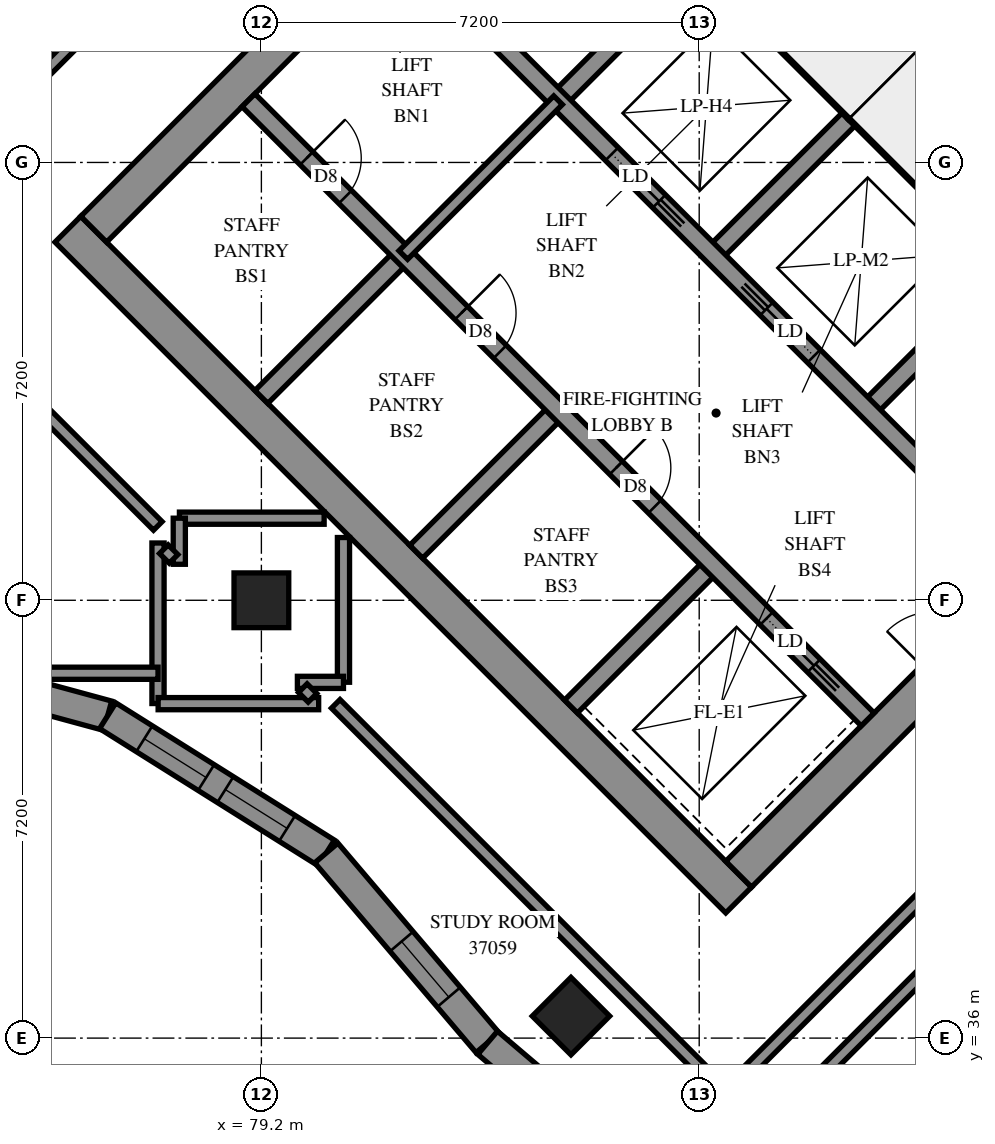
"""IFC4 building model, lengths in metres.
Left out: names, types, materials, properties, quantities, classifications, styles, units other than length and angle.
Written with IfcOpenShell. Run it as: python <this file> out.ifc"""

import sys

from ifc_helpers import new_model, si_unit, direction, frame, frame_2d, origin, origin_2d, place, context, subcontext, project, spatial, polyline, rectangle, outline, extrude, element, fill, save


model = new_model("IFC4")
c1 = context("Model", 3, precision=1e-05, world=origin(), true_north=direction((0.0, 1.0)))
c2 = subcontext(c1, "Body", "Model", "MODEL_VIEW")
j1 = project(units=[si_unit("LENGTHUNIT", "METRE"), si_unit("PLANEANGLEUNIT", "RADIAN")], contexts=[c1])
p1 = place(None, origin())
s1 = spatial("IfcSite", under=j1, at=p1, CompositionType="ELEMENT")
p2 = place(p1, origin())
s2 = spatial("IfcBuilding", under=s1, at=p2, CompositionType="ELEMENT")
p3 = place(p2, frame((0.0, 0.0, 138.8)))
s3 = spatial("IfcBuildingStorey", under=s2, at=p3, CompositionType="ELEMENT", Elevation=138.8)
for number, where, z_axis, x_axis in (
    (1, (79.2, 43.2, 0.0), (0.0, 0.0, 1.0), (1.0, 0.0, 0.0)),
    (2, (84.291, 36.362, 0.0), (0.0, 0.0, 1.0), (0.707, -0.707, 0.0)),
):
    element("IfcColumn", number, at=place(p3, frame(where, z_axis=z_axis, x_axis=x_axis)), inside=s3, PredefinedType="COLUMN", context=c2, shape_type="SweptSolid", body=[
        extrude(rectangle(XDim=0.9, YDim=0.9, at=origin_2d()), origin(), (0.0, 0.0, 1.0), 3.1),
    ])
p4 = place(p3, frame((76.018, 49.302, -0.3), z_axis=(0.0, 0.0, 1.0), x_axis=(0.7071067812, -0.7071067812, 0.0)))
e3 = element("IfcWall", 3, at=p4, inside=s3, PredefinedType="SHEAR", context=c2, shape_type="SweptSolid", body=[
    extrude(rectangle(XDim=15.6, YDim=0.6, at=frame_2d((7.8, 0.0))), origin(), (0.0, 0.0, 1.0), 2.7),
])
p5 = place(p3, frame((86.625, 59.908, -0.3), z_axis=(0.0, 0.0, 1.0), x_axis=(0.7071067812, -0.7071067812, 0.0)))
e4 = element("IfcWall", 4, at=p5, inside=s3, PredefinedType="SHEAR", context=c2, shape_type="SweptSolid", body=[
    extrude(rectangle(XDim=15.6, YDim=0.6, at=frame_2d((7.8, 0.0))), origin(), (0.0, 0.0, 1.0), 2.7),
])
p6 = place(p5, frame((10.6, 0.0, 0.3)))
e5 = element("IfcOpeningElement", 5, at=p6, cuts=e4, PredefinedType="OPENING", context=c2, shape_type="SweptSolid", body=[
    extrude(rectangle(XDim=0.8, YDim=2.1, at=frame_2d((0.4, 1.05))), frame((0.0, 0.31, 0.0), z_axis=(0.0, -1.0, 0.0), x_axis=(1.0, 0.0, 0.0)), (0.0, 0.0, 1.0), 0.62),
])
p7 = place(p3, frame((76.442, 49.302, -0.3), z_axis=(0.0, 0.0, 1.0), x_axis=(0.7071067812, 0.7071067812, 0.0)))
e6 = element("IfcWall", 6, at=p7, inside=s3, PredefinedType="SHEAR", context=c2, shape_type="SweptSolid", body=[
    extrude(rectangle(XDim=14.4, YDim=0.6, at=frame_2d((7.2, 0.0))), origin(), (0.0, 0.0, 1.0), 2.7),
])
p8 = place(p7, frame((4.55, 0.0, 0.3)))
e7 = element("IfcOpeningElement", 7, at=p8, cuts=e6, PredefinedType="OPENING", context=c2, shape_type="SweptSolid", body=[
    extrude(rectangle(XDim=1.1, YDim=2.1, at=frame_2d((0.55, 1.05))), frame((0.0, 0.31, 0.0), z_axis=(0.0, -1.0, 0.0), x_axis=(1.0, 0.0, 0.0)), (0.0, 0.0, 1.0), 0.62),
])
p9 = place(p7, frame((11.35, 0.0, 0.3)))
e8 = element("IfcOpeningElement", 8, at=p9, cuts=e6, PredefinedType="OPENING", context=c2, shape_type="SweptSolid", body=[
    extrude(rectangle(XDim=1.1, YDim=2.1, at=frame_2d((0.55, 1.05))), frame((0.0, 0.31, 0.0), z_axis=(0.0, -1.0, 0.0), x_axis=(1.0, 0.0, 0.0)), (0.0, 0.0, 1.0), 0.62),
])
p10 = place(p3, frame((87.049, 38.695, -0.3), z_axis=(0.0, 0.0, 1.0), x_axis=(0.7071067812, 0.7071067812, 0.0)))
e9 = element("IfcWall", 9, at=p10, inside=s3, PredefinedType="SHEAR", context=c2, shape_type="SweptSolid", body=[
    extrude(rectangle(XDim=14.4, YDim=0.6, at=frame_2d((7.2, 0.0))), origin(), (0.0, 0.0, 1.0), 2.7),
])
p11 = place(p10, frame((4.55, 0.0, 0.3)))
e10 = element("IfcOpeningElement", 10, at=p11, cuts=e9, PredefinedType="OPENING", context=c2, shape_type="SweptSolid", body=[
    extrude(rectangle(XDim=1.1, YDim=2.1, at=frame_2d((0.55, 1.05))), frame((0.0, 0.31, 0.0), z_axis=(0.0, -1.0, 0.0), x_axis=(1.0, 0.0, 0.0)), (0.0, 0.0, 1.0), 0.62),
])
p12 = place(p10, frame((11.35, 0.0, 0.3)))
e11 = element("IfcOpeningElement", 11, at=p12, cuts=e9, PredefinedType="OPENING", context=c2, shape_type="SweptSolid", body=[
    extrude(rectangle(XDim=1.1, YDim=2.1, at=frame_2d((0.55, 1.05))), frame((0.0, 0.31, 0.0), z_axis=(0.0, -1.0, 0.0), x_axis=(1.0, 0.0, 0.0)), (0.0, 0.0, 1.0), 0.62),
])
for number, where, z_axis, x_axis in (
    (12, (79.2, 46.544, 0.0), (0.0, 0.0, 1.0), (0.707, 0.707, 0.0)),
    (13, (84.079, 51.423, 0.0), (0.0, 0.0, 1.0), (0.707, 0.707, 0.0)),
):
    element("IfcWall", number, at=place(p3, frame(where, z_axis=z_axis, x_axis=x_axis)), inside=s3, PredefinedType="SOLIDWALL", context=c2, shape_type="SweptSolid", body=[
        extrude(rectangle(XDim=3.3, YDim=0.3, at=frame_2d((1.65, 0.0))), origin(), (0.0, 0.0, 1.0), 3.1),
    ])
p13 = place(p3, frame((81.746, 43.999, 0.0), z_axis=(0.0, 0.0, 1.0), x_axis=(0.7071067812, 0.7071067812, 0.0)))
e14 = element("IfcWall", 14, at=p13, inside=s3, PredefinedType="SOLIDWALL", context=c2, shape_type="SweptSolid", body=[
    extrude(rectangle(XDim=3.3, YDim=0.3, at=frame_2d((1.65, 0.0))), origin(), (0.0, 0.0, 1.0), 3.1),
])
p14 = place(p3, frame((86.625, 48.878, 0.0), z_axis=(0.0, 0.0, 1.0), x_axis=(0.7071067812, 0.7071067812, 0.0)))
e15 = element("IfcWall", 15, at=p14, inside=s3, PredefinedType="SOLIDWALL", context=c2, shape_type="SweptSolid", body=[
    extrude(rectangle(XDim=3.3, YDim=0.3, at=frame_2d((1.65, 0.0))), origin(), (0.0, 0.0, 1.0), 3.1),
])
p15 = place(p3, frame((84.291, 41.453, 0.0), z_axis=(0.0, 0.0, 1.0), x_axis=(0.7071067812, 0.7071067812, 0.0)))
e16 = element("IfcWall", 16, at=p15, inside=s3, PredefinedType="SOLIDWALL", context=c2, shape_type="SweptSolid", body=[
    extrude(rectangle(XDim=3.3, YDim=0.3, at=frame_2d((1.65, 0.0))), origin(), (0.0, 0.0, 1.0), 3.1),
])
p16 = place(p3, frame((89.17, 46.332, 0.0), z_axis=(0.0, 0.0, 1.0), x_axis=(0.7071067812, 0.7071067812, 0.0)))
e17 = element("IfcWall", 17, at=p16, inside=s3, PredefinedType="SOLIDWALL", context=c2, shape_type="SweptSolid", body=[
    extrude(rectangle(XDim=3.3, YDim=0.3, at=frame_2d((1.65, 0.0))), origin(), (0.0, 0.0, 1.0), 3.1),
])
p17 = place(p3, frame((78.988, 51.423, 0.0), z_axis=(0.0, 0.0, 1.0), x_axis=(0.7071067812, -0.7071067812, 0.0)))
e18 = element("IfcWall", 18, at=p17, inside=s3, PredefinedType="SOLIDWALL", context=c2, shape_type="SweptSolid", body=[
    extrude(rectangle(XDim=14.4, YDim=0.3, at=frame_2d((7.2, 0.0))), origin(), (0.0, 0.0, 1.0), 3.1),
])
p18 = place(p17, frame((1.35, 0.0, 0.0)))
e19 = element("IfcOpeningElement", 19, at=p18, cuts=e18, PredefinedType="OPENING", context=c2, shape_type="SweptSolid", body=[
    extrude(rectangle(XDim=0.9, YDim=2.1, at=frame_2d((0.45, 1.05))), frame((0.0, 0.16, 0.0), z_axis=(0.0, -1.0, 0.0), x_axis=(1.0, 0.0, 0.0)), (0.0, 0.0, 1.0), 0.32),
])
p19 = place(p17, frame((4.95, 0.0, 0.0)))
e20 = element("IfcOpeningElement", 20, at=p19, cuts=e18, PredefinedType="OPENING", context=c2, shape_type="SweptSolid", body=[
    extrude(rectangle(XDim=0.9, YDim=2.1, at=frame_2d((0.45, 1.05))), frame((0.0, 0.16, 0.0), z_axis=(0.0, -1.0, 0.0), x_axis=(1.0, 0.0, 0.0)), (0.0, 0.0, 1.0), 0.32),
])
p20 = place(p17, frame((8.55, 0.0, 0.0)))
e21 = element("IfcOpeningElement", 21, at=p20, cuts=e18, PredefinedType="OPENING", context=c2, shape_type="SweptSolid", body=[
    extrude(rectangle(XDim=0.9, YDim=2.1, at=frame_2d((0.45, 1.05))), frame((0.0, 0.16, 0.0), z_axis=(0.0, -1.0, 0.0), x_axis=(1.0, 0.0, 0.0)), (0.0, 0.0, 1.0), 0.32),
])
p21 = place(p17, frame((12.05, 0.0, 0.0)))
e22 = element("IfcOpeningElement", 22, at=p21, cuts=e18, PredefinedType="OPENING", context=c2, shape_type="SweptSolid", body=[
    extrude(rectangle(XDim=1.1, YDim=2.1, at=frame_2d((0.55, 1.05))), frame((0.0, 0.16, 0.0), z_axis=(0.0, -1.0, 0.0), x_axis=(1.0, 0.0, 0.0)), (0.0, 0.0, 1.0), 0.32),
])
p22 = place(p3, frame((81.534, 53.969, 0.0), z_axis=(0.0, 0.0, 1.0), x_axis=(0.707103309, -0.7071102534, 0.0)))
e23 = element("IfcWall", 23, at=p22, inside=s3, PredefinedType="SOLIDWALL", context=c2, shape_type="SweptSolid", body=[
    extrude(rectangle(XDim=14.4, YDim=0.3, at=frame_2d((7.2, 0.0))), origin(), (0.0, 0.0, 1.0), 3.1),
])
p23 = place(p22, frame((1.25, 0.0, 0.0)))
e24 = element("IfcOpeningElement", 24, at=p23, cuts=e23, PredefinedType="OPENING", context=c2, shape_type="SweptSolid", body=[
    extrude(rectangle(XDim=1.1, YDim=2.1, at=frame_2d((0.55, 1.05))), frame((0.0, 0.16, 0.0), z_axis=(0.0, -1.0, 0.0), x_axis=(1.0, 0.0, 0.0)), (0.0, 0.0, 1.0), 0.32),
])
p24 = place(p22, frame((4.85, 0.0, 0.0)))
e25 = element("IfcOpeningElement", 25, at=p24, cuts=e23, PredefinedType="OPENING", context=c2, shape_type="SweptSolid", body=[
    extrude(rectangle(XDim=1.1, YDim=2.1, at=frame_2d((0.55, 1.05))), frame((0.0, 0.16, 0.0), z_axis=(0.0, -1.0, 0.0), x_axis=(1.0, 0.0, 0.0)), (0.0, 0.0, 1.0), 0.32),
])
p25 = place(p22, frame((8.45, 0.0, 0.0)))
e26 = element("IfcOpeningElement", 26, at=p25, cuts=e23, PredefinedType="OPENING", context=c2, shape_type="SweptSolid", body=[
    extrude(rectangle(XDim=1.1, YDim=2.1, at=frame_2d((0.55, 1.05))), frame((0.0, 0.16, 0.0), z_axis=(0.0, -1.0, 0.0), x_axis=(1.0, 0.0, 0.0)), (0.0, 0.0, 1.0), 0.32),
])
p26 = place(p22, frame((12.05, 0.0, 0.0)))
e27 = element("IfcOpeningElement", 27, at=p26, cuts=e23, PredefinedType="OPENING", context=c2, shape_type="SweptSolid", body=[
    extrude(rectangle(XDim=1.1, YDim=2.1, at=frame_2d((0.55, 1.05))), frame((0.0, 0.16, 0.0), z_axis=(0.0, -1.0, 0.0), x_axis=(1.0, 0.0, 0.0)), (0.0, 0.0, 1.0), 0.32),
])
for number, where, z_axis, x_axis in (
    (28, (83.867, 56.302, 0.0), (0.0, 0.0, 1.0), (0.707, -0.707, 0.0)),
    (29, (88.958, 51.211, 0.0), (0.0, 0.0, 1.0), (0.707, -0.707, 0.0)),
):
    element("IfcWall", number, at=place(p3, frame(where, z_axis=z_axis, x_axis=x_axis)), inside=s3, PredefinedType="SOLIDWALL", context=c2, shape_type="SweptSolid", body=[
        extrude(rectangle(XDim=7.2, YDim=0.3, at=frame_2d((3.6, 0.0))), origin(), (0.0, 0.0, 1.0), 3.1),
    ])
p27 = place(p3, frame((88.958, 51.211, 0.0), z_axis=(0.0, 0.0, 1.0), x_axis=(0.7071067812, 0.7071067812, 0.0)))
e30 = element("IfcWall", 30, at=p27, inside=s3, PredefinedType="SOLIDWALL", context=c2, shape_type="SweptSolid", body=[
    extrude(rectangle(XDim=4.2, YDim=0.3, at=frame_2d((2.1, 0.0))), origin(), (0.0, 0.0, 1.0), 3.1),
])
p28 = place(p3, frame((73.171, 42.253, 0.0), z_axis=(0.0, 0.0, 1.0), x_axis=(0.9649873507, -0.2622964218, 0.0)))
e31 = element("IfcWall", 31, at=p28, inside=s3, PredefinedType="SOLIDWALL", context=c2, shape_type="SweptSolid", body=[
    extrude(outline(polyline([(0.046, -0.25), (3.591, -0.25), (3.666, 0.25), (-0.046, 0.25), (0.046, -0.25)])), origin(), (0.0, 0.0, 1.0), 3.1),
])
p29 = place(p28, frame((0.609, 0.0, 0.45)))
e32 = element("IfcOpeningElement", 32, at=p29, cuts=e31, PredefinedType="OPENING", context=c2, shape_type="SweptSolid", body=[
    extrude(rectangle(XDim=1.2, YDim=2.5, at=frame_2d((0.6, 1.25))), frame((0.0, 0.26, 0.0), z_axis=(0.0, -1.0, 0.0), x_axis=(1.0, 0.0, 0.0)), (0.0, 0.0, 1.0), 0.52),
])
p30 = place(p3, frame((76.672, 41.301, 0.0), z_axis=(0.0, 0.0, 1.0), x_axis=(0.8470056686, -0.5315838574, 0.0)))
e33 = element("IfcWall", 33, at=p30, inside=s3, PredefinedType="SOLIDWALL", context=c2, shape_type="SweptSolid", body=[
    extrude(outline(polyline([(0.037, -0.25), (4.207, -0.25), (4.284, 0.25), (-0.037, 0.25), (0.037, -0.25)])), origin(), (0.0, 0.0, 1.0), 3.1),
])
p31 = place(p30, frame((0.712, 0.0, 0.45)))
e34 = element("IfcOpeningElement", 34, at=p31, cuts=e33, PredefinedType="OPENING", context=c2, shape_type="SweptSolid", body=[
    extrude(rectangle(XDim=1.2, YDim=2.5, at=frame_2d((0.6, 1.25))), frame((0.0, 0.26, 0.0), z_axis=(0.0, -1.0, 0.0), x_axis=(1.0, 0.0, 0.0)), (0.0, 0.0, 1.0), 0.52),
])
p32 = place(p30, frame((2.285, 0.0, 0.45)))
e35 = element("IfcOpeningElement", 35, at=p32, cuts=e33, PredefinedType="OPENING", context=c2, shape_type="SweptSolid", body=[
    extrude(rectangle(XDim=1.2, YDim=2.5, at=frame_2d((0.6, 1.25))), frame((0.0, 0.26, 0.0), z_axis=(0.0, -1.0, 0.0), x_axis=(1.0, 0.0, 0.0)), (0.0, 0.0, 1.0), 0.52),
])
p33 = place(p3, frame((80.268, 39.045, 0.0), z_axis=(0.0, 0.0, 1.0), x_axis=(0.6475669262, -0.76200858, 0.0)))
e36 = element("IfcWall", 36, at=p33, inside=s3, PredefinedType="SOLIDWALL", context=c2, shape_type="SweptSolid", body=[
    extrude(outline(polyline([(0.038, -0.25), (4.117, -0.25), (4.076, 0.25), (-0.038, 0.25), (0.038, -0.25)])), origin(), (0.0, 0.0, 1.0), 3.1),
])
p34 = place(p33, frame((1.911, 0.0, 0.45)))
e37 = element("IfcOpeningElement", 37, at=p34, cuts=e36, PredefinedType="OPENING", context=c2, shape_type="SweptSolid", body=[
    extrude(rectangle(XDim=1.2, YDim=2.5, at=frame_2d((0.6, 1.25))), frame((0.0, 0.26, 0.0), z_axis=(0.0, -1.0, 0.0), x_axis=(1.0, 0.0, 0.0)), (0.0, 0.0, 1.0), 0.52),
])
p35 = place(p3, frame((82.921, 35.923, 0.0), z_axis=(0.0, 0.0, 1.0), x_axis=(0.7620191747, -0.647554459, 0.0)))
e38 = element("IfcWall", 38, at=p35, inside=s3, PredefinedType="SOLIDWALL", context=c2, shape_type="SweptSolid", body=[
    extrude(outline(polyline([(-0.02, -0.25), (4.058, -0.25), (4.098, 0.25), (0.02, 0.25), (-0.02, -0.25)])), origin(), (0.0, 0.0, 1.0), 3.1),
])
p36 = place(p35, frame((0.87, 0.0, 0.45)))
e39 = element("IfcOpeningElement", 39, at=p36, cuts=e38, PredefinedType="OPENING", context=c2, shape_type="SweptSolid", body=[
    extrude(rectangle(XDim=2.8, YDim=2.5, at=frame_2d((1.4, 1.25))), frame((0.0, 0.26, 0.0), z_axis=(0.0, -1.0, 0.0), x_axis=(1.0, 0.0, 0.0)), (0.0, 0.0, 1.0), 0.52),
])
p37 = place(p3, frame((81.534, 48.878, 0.0), z_axis=(0.0, 0.0, 1.0), x_axis=(0.707092892, 0.7071206701, 0.0)))
e40 = element("IfcWall", 40, at=p37, inside=s3, PredefinedType="PARTITIONING", context=c2, shape_type="SweptSolid", body=[
    extrude(rectangle(XDim=3.6, YDim=0.2, at=frame_2d((1.8, 0.0))), origin(), (0.0, 0.0, 1.0), 3.1),
])
p38 = place(p3, frame((86.331, 33.312, 0.0), z_axis=(0.0, 0.0, 1.0), x_axis=(0.7071067812, 0.7071067812, 0.0)))
e41 = element("IfcWall", 41, at=p38, inside=s3, PredefinedType="PARTITIONING", context=c2, shape_type="SweptSolid", body=[
    extrude(rectangle(XDim=10.514, YDim=0.2, at=frame_2d((5.257, 0.0))), origin(), (0.0, 0.0, 1.0), 3.1),
])
p39 = place(p3, frame((80.423, 41.497, 0.0), z_axis=(0.0, 0.0, 1.0), x_axis=(0.7071067812, -0.7071067812, 0.0)))
e42 = element("IfcWall", 42, at=p39, inside=s3, PredefinedType="PARTITIONING", context=c2, shape_type="SweptSolid", body=[
    extrude(rectangle(XDim=9.065, YDim=0.2, at=frame_2d((4.532, 0.0))), origin(), (0.0, 0.0, 1.0), 3.1),
])
p40 = place(p3, frame((86.837, 35.091, 0.0), z_axis=(0.0, 0.0, 1.0), x_axis=(0.7071067812, 0.7071067812, 0.0)))
e43 = element("IfcWall", 43, at=p40, inside=s3, PredefinedType="PARTITIONING", context=c2, shape_type="SweptSolid", body=[
    extrude(rectangle(XDim=8.898, YDim=0.2, at=frame_2d((4.449, 0.0))), origin(), (0.0, 0.0, 1.0), 3.1),
])
p41 = place(p40, frame((7.7, 0.0, 0.0)))
e44 = element("IfcOpeningElement", 44, at=p41, cuts=e43, PredefinedType="OPENING", context=c2, shape_type="SweptSolid", body=[
    extrude(rectangle(XDim=1.0, YDim=2.1, at=frame_2d((0.5, 1.05))), frame((0.0, 0.11, 0.0), z_axis=(0.0, -1.0, 0.0), x_axis=(1.0, 0.0, 0.0)), (0.0, 0.0, 1.0), 0.22),
])
p42 = place(p3, frame((74.223, 47.697, 0.0), z_axis=(0.0, 0.0, 1.0), x_axis=(0.7071067812, -0.7071067812, 0.0)))
e45 = element("IfcWall", 45, at=p42, inside=s3, PredefinedType="PARTITIONING", context=c2, shape_type="SweptSolid", body=[
    extrude(rectangle(XDim=4.63, YDim=0.2, at=frame_2d((2.315, 0.0))), origin(), (0.0, 0.0, 1.0), 3.1),
])
p43 = place(p42, frame((0.401, 0.0, 0.0)))
e46 = element("IfcOpeningElement", 46, at=p43, cuts=e45, PredefinedType="OPENING", context=c2, shape_type="SweptSolid", body=[
    extrude(rectangle(XDim=1.0, YDim=2.1, at=frame_2d((0.5, 1.05))), frame((0.0, 0.11, 0.0), z_axis=(0.0, -1.0, 0.0), x_axis=(1.0, 0.0, 0.0)), (0.0, 0.0, 1.0), 0.22),
])
p44 = place(p3, frame((74.701, 50.957, 0.0), z_axis=(0.0, 0.0, 1.0), x_axis=(0.7071067812, 0.7071067812, 0.0)))
e47 = element("IfcWall", 47, at=p44, inside=s3, PredefinedType="PARTITIONING", context=c2, shape_type="SweptSolid", body=[
    extrude(rectangle(XDim=2.888, YDim=0.2, at=frame_2d((1.444, 0.0))), origin(), (0.0, 0.0, 1.0), 3.1),
])
for number, where, z_axis, x_axis in (
    (48, (77.5, 41.502, 0.0), (0.0, 0.0, 1.0), (0.0, 1.0, 0.0)),
    (49, (77.502, 41.5, 0.0), (0.0, 0.0, 1.0), (1.0, 0.0, 0.0)),
):
    element("IfcWall", number, at=place(p3, frame(where, z_axis=z_axis, x_axis=x_axis)), inside=s3, PredefinedType="PARTITIONING", context=c2, shape_type="SweptSolid", body=[
        extrude(rectangle(XDim=2.64, YDim=0.2, at=frame_2d((1.32, 0.0))), origin(), (0.0, 0.0, 1.0), 3.1),
    ])
p45 = place(p3, frame((75.106, 42.0, 0.0), z_axis=(0.0, 0.0, 1.0), x_axis=(1.0, 0.0, 0.0)))
e50 = element("IfcWall", 50, at=p45, inside=s3, PredefinedType="PARTITIONING", context=c2, shape_type="SweptSolid", body=[
    extrude(rectangle(XDim=2.394, YDim=0.2, at=frame_2d((1.197, 0.0))), origin(), (0.0, 0.0, 1.0), 3.1),
])
for number, where, z_axis, x_axis in (
    (51, (80.55, 41.852, 0.0), (0.0, 0.0, 1.0), (0.0, 1.0, 0.0)),
    (52, (77.852, 44.55, 0.0), (0.0, 0.0, 1.0), (1.0, 0.0, 0.0)),
):
    element("IfcWall", number, at=place(p3, frame(where, z_axis=z_axis, x_axis=x_axis)), inside=s3, PredefinedType="PARTITIONING", context=c2, shape_type="SweptSolid", body=[
        extrude(rectangle(XDim=2.38, YDim=0.2, at=frame_2d((1.19, 0.0))), origin(), (0.0, 0.0, 1.0), 3.1),
    ])
for number, where, z_axis, x_axis in (
    (53, (77.85, 43.792, 0.0), (0.0, 0.0, 1.0), (0.0, 1.0, 0.0)),
    (54, (79.792, 41.85, 0.0), (0.0, 0.0, 1.0), (1.0, 0.0, 0.0)),
):
    element("IfcWall", number, at=place(p3, frame(where, z_axis=z_axis, x_axis=x_axis)), inside=s3, PredefinedType="PARTITIONING", context=c2, shape_type="SweptSolid", body=[
        extrude(rectangle(XDim=0.758, YDim=0.2, at=frame_2d((0.379, 0.0))), origin(), (0.0, 0.0, 1.0), 3.1),
    ])
for number, where, z_axis, x_axis in (
    (55, (79.881, 41.755, 0.0), (0.0, 0.0, 1.0), (0.707, -0.707, 0.0)),
    (56, (77.596, 44.04, 0.0), (0.0, 0.0, 1.0), (0.707, -0.707, 0.0)),
):
    element("IfcWall", number, at=place(p3, frame(where, z_axis=z_axis, x_axis=x_axis)), inside=s3, PredefinedType="PARTITIONING", context=c2, shape_type="SweptSolid", body=[
        extrude(rectangle(XDim=0.225, YDim=0.2, at=frame_2d((0.113, 0.0))), origin(), (0.0, 0.0, 1.0), 3.1),
    ])
p46 = place(p31, origin())
e57 = element("IfcWindow", 57, at=p46, inside=s3, PartitioningType="SINGLE_PANEL", PredefinedType="WINDOW", context=c2, shape_type="SweptSolid", body=[
    extrude(rectangle(XDim=1.2, YDim=2.5, at=frame_2d((0.6, 1.25))), frame((0.0, 0.18, 0.0), z_axis=(0.0, -1.0, 0.0), x_axis=(1.0, 0.0, 0.0)), (0.0, 0.0, 1.0), 0.06),
])
fill(e34, e57)
p47 = place(p32, origin())
e58 = element("IfcWindow", 58, at=p47, inside=s3, PartitioningType="SINGLE_PANEL", PredefinedType="WINDOW", context=c2, shape_type="SweptSolid", body=[
    extrude(rectangle(XDim=1.2, YDim=2.5, at=frame_2d((0.6, 1.25))), frame((0.0, 0.18, 0.0), z_axis=(0.0, -1.0, 0.0), x_axis=(1.0, 0.0, 0.0)), (0.0, 0.0, 1.0), 0.06),
])
fill(e35, e58)
p48 = place(p34, origin())
e59 = element("IfcWindow", 59, at=p48, inside=s3, PartitioningType="SINGLE_PANEL", PredefinedType="WINDOW", context=c2, shape_type="SweptSolid", body=[
    extrude(rectangle(XDim=1.2, YDim=2.5, at=frame_2d((0.6, 1.25))), frame((0.0, 0.18, 0.0), z_axis=(0.0, -1.0, 0.0), x_axis=(1.0, 0.0, 0.0)), (0.0, 0.0, 1.0), 0.06),
])
fill(e37, e59)
p49 = place(p18, origin())
e60 = element("IfcDoor", 60, at=p49, inside=s3, OperationType="SINGLE_SWING_LEFT", PredefinedType="DOOR", context=c2, shape_type="SweptSolid", body=[
    extrude(rectangle(XDim=0.9, YDim=2.1, at=frame_2d((0.45, 1.05))), frame((0.0, 0.025, 0.0), z_axis=(0.0, -1.0, 0.0), x_axis=(1.0, 0.0, 0.0)), (0.0, 0.0, 1.0), 0.05),
])
fill(e19, e60)
p50 = place(p19, origin())
e61 = element("IfcDoor", 61, at=p50, inside=s3, OperationType="SINGLE_SWING_LEFT", PredefinedType="DOOR", context=c2, shape_type="SweptSolid", body=[
    extrude(rectangle(XDim=0.9, YDim=2.1, at=frame_2d((0.45, 1.05))), frame((0.0, 0.025, 0.0), z_axis=(0.0, -1.0, 0.0), x_axis=(1.0, 0.0, 0.0)), (0.0, 0.0, 1.0), 0.05),
])
fill(e20, e61)
p51 = place(p20, origin())
e62 = element("IfcDoor", 62, at=p51, inside=s3, OperationType="SINGLE_SWING_LEFT", PredefinedType="DOOR", context=c2, shape_type="SweptSolid", body=[
    extrude(rectangle(XDim=0.9, YDim=2.1, at=frame_2d((0.45, 1.05))), frame((0.0, 0.025, 0.0), z_axis=(0.0, -1.0, 0.0), x_axis=(1.0, 0.0, 0.0)), (0.0, 0.0, 1.0), 0.05),
])
fill(e21, e62)
p52 = place(p21, origin())
e63 = element("IfcDoor", 63, at=p52, inside=s3, OperationType="SLIDING_TO_RIGHT", PredefinedType="DOOR", context=c2, shape_type="SweptSolid", body=[
    extrude(rectangle(XDim=1.1, YDim=2.1, at=frame_2d((0.55, 1.05))), frame((0.0, 0.025, 0.0), z_axis=(0.0, -1.0, 0.0), x_axis=(1.0, 0.0, 0.0)), (0.0, 0.0, 1.0), 0.05),
])
fill(e22, e63)
p53 = place(p24, origin())
e64 = element("IfcDoor", 64, at=p53, inside=s3, OperationType="SLIDING_TO_RIGHT", PredefinedType="DOOR", context=c2, shape_type="SweptSolid", body=[
    extrude(rectangle(XDim=1.1, YDim=2.1, at=frame_2d((0.55, 1.05))), frame((0.0, 0.025, 0.0), z_axis=(0.0, -1.0, 0.0), x_axis=(1.0, 0.0, 0.0)), (0.0, 0.0, 1.0), 0.05),
])
fill(e25, e64)
p54 = place(p25, origin())
e65 = element("IfcDoor", 65, at=p54, inside=s3, OperationType="SLIDING_TO_LEFT", PredefinedType="DOOR", context=c2, shape_type="SweptSolid", body=[
    extrude(rectangle(XDim=1.1, YDim=2.1, at=frame_2d((0.55, 1.05))), frame((0.0, 0.025, 0.0), z_axis=(0.0, -1.0, 0.0), x_axis=(1.0, 0.0, 0.0)), (0.0, 0.0, 1.0), 0.05),
])
fill(e26, e65)
save(model, sys.argv[1])
